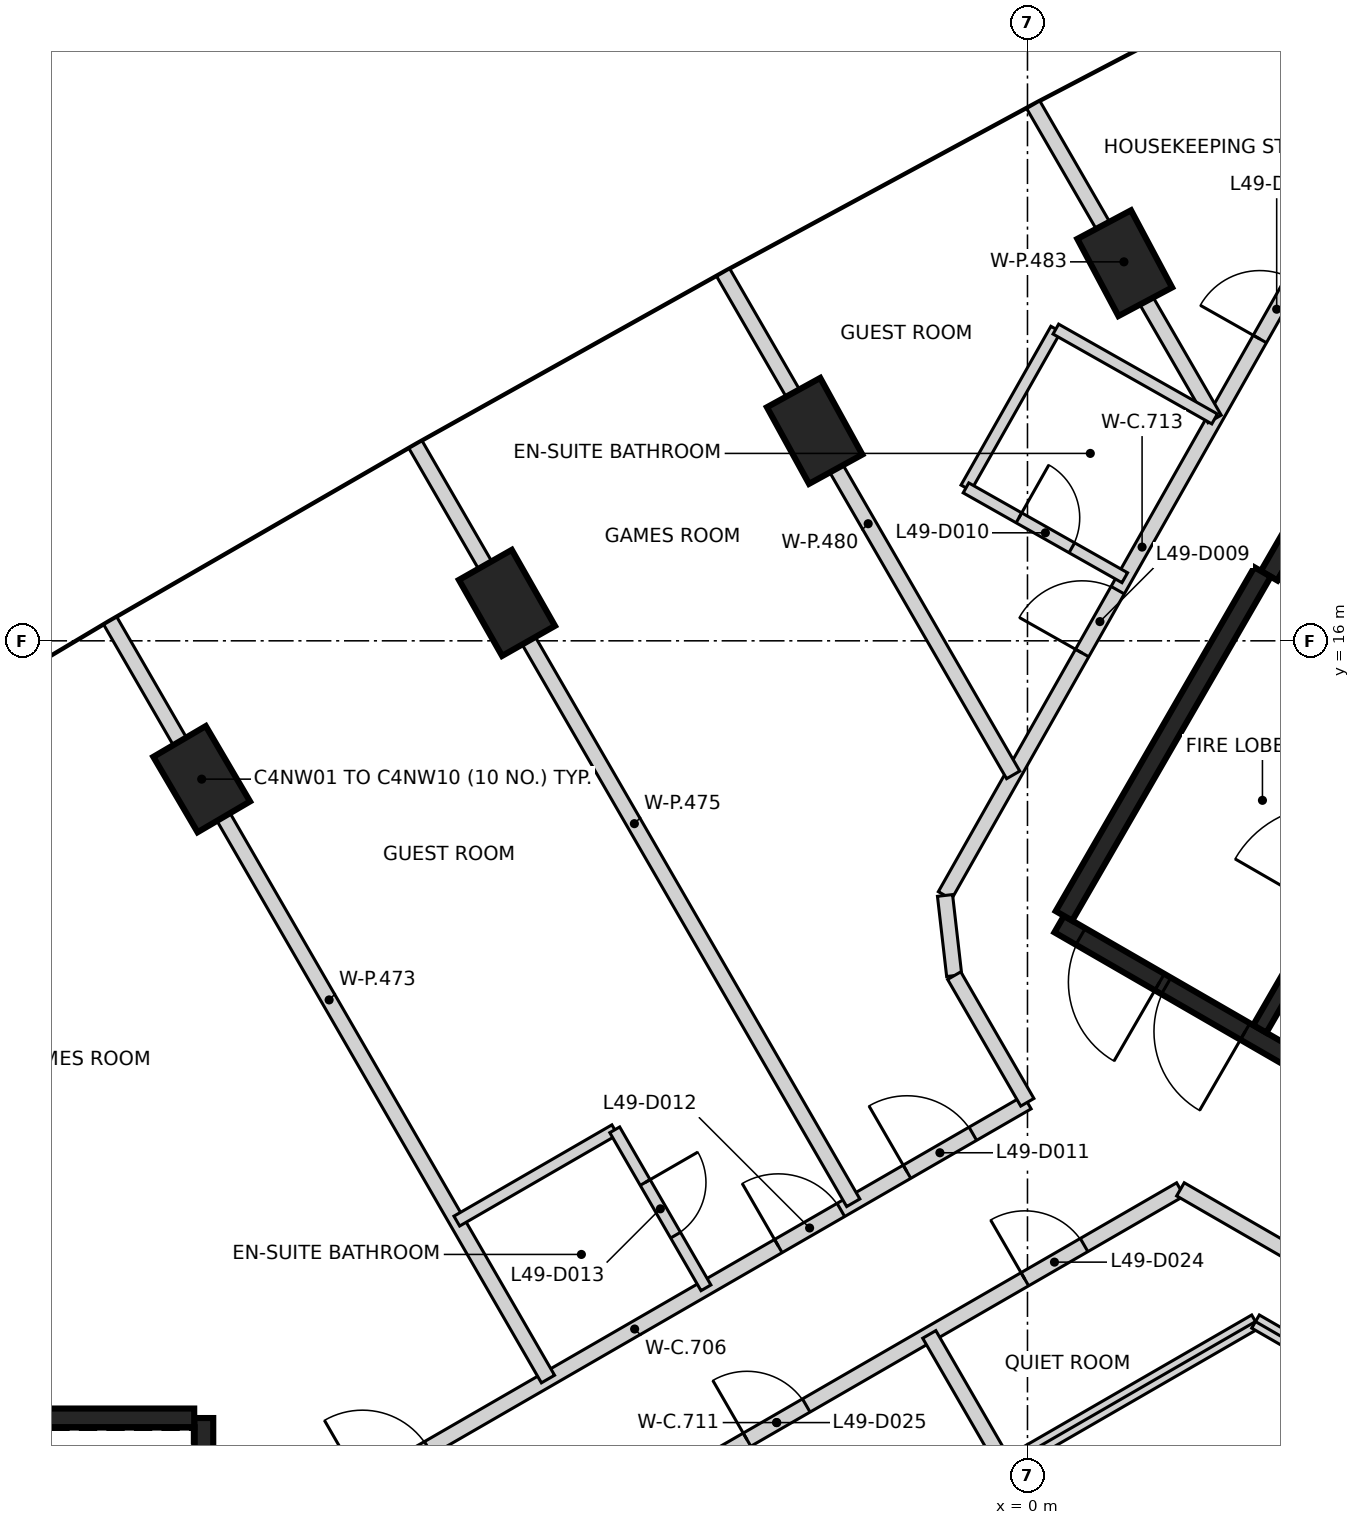
"""IFC4 building model, lengths in metres.
Left out: names, types, materials, properties, quantities, classifications, styles, units other than length and angle.
Written with IfcOpenShell. Run it as: python <this file> out.ifc"""

import sys

from ifc_helpers import new_model, si_unit, direction, frame, frame_2d, origin, origin_2d, place, context, subcontext, project, spatial, rectangle, extrude, element, fill, save


model = new_model("IFC4")
c1 = context("Model", 3, precision=1e-05, world=origin(), true_north=direction((0.0, 1.0)))
c2 = subcontext(c1, "Body", "Model", "MODEL_VIEW")
j1 = project(units=[si_unit("LENGTHUNIT", "METRE"), si_unit("PLANEANGLEUNIT", "RADIAN")], contexts=[c1])
p1 = place(None, origin())
s1 = spatial("IfcSite", under=j1, at=p1, CompositionType="ELEMENT")
p2 = place(p1, origin())
s2 = spatial("IfcBuilding", under=s1, at=p2, CompositionType="ELEMENT")
p3 = place(p2, frame((0.0, 0.0, 197.2)))
s3 = spatial("IfcBuildingStorey", under=s2, at=p3, CompositionType="ELEMENT", Elevation=197.2)
for number, where, z_axis, x_axis in (
    (1, (1.279, 20.968, -0.35), (0.0, 0.0, 1.0), (-0.47, 0.883, 0.0)),
    (2, (-2.8, 18.762, -0.35), (0.0, 0.0, 1.0), (-0.482, 0.876, 0.0)),
    (3, (-6.848, 16.499, -0.35), (0.0, 0.0, 1.0), (-0.494, 0.87, 0.0)),
    (4, (-10.864, 14.18, -0.35), (0.0, 0.0, 1.0), (-0.506, 0.862, 0.0)),
):
    element("IfcColumn", number, at=place(p3, frame(where, z_axis=z_axis, x_axis=x_axis)), inside=s3, PredefinedType="COLUMN", context=c2, shape_type="SweptSolid", body=[
        extrude(rectangle(XDim=1.15, YDim=0.8, at=origin_2d()), origin(), (0.0, 0.0, 1.0), 3.6),
    ])
p4 = place(p3, frame((-10.837, 5.775, 0.0), z_axis=(0.0, 0.0, 1.0), x_axis=(0.0, -1.0, 0.0)))
e5 = element("IfcWall", 5, at=p4, inside=s3, PredefinedType="SHEAR", context=c2, shape_type="SweptSolid", body=[
    extrude(rectangle(XDim=11.55, YDim=0.25, at=frame_2d((5.775, 0.0))), origin(), (0.0, 0.0, 1.0), 3.25),
])
p5 = place(p4, frame((10.025, 0.0, 0.0)))
e6 = element("IfcOpeningElement", 6, at=p5, cuts=e5, PredefinedType="OPENING", context=c2, shape_type="SweptSolid", body=[
    extrude(rectangle(XDim=1.2, YDim=2.1, at=frame_2d((0.6, 1.05))), frame((0.0, 0.135, 0.0), z_axis=(0.0, -1.0, 0.0), x_axis=(1.0, 0.0, 0.0)), (0.0, 0.0, 1.0), 0.27),
])
p6 = place(p4, frame((8.725, 0.0, 0.0)))
e7 = element("IfcOpeningElement", 7, at=p6, cuts=e5, PredefinedType="OPENING", context=c2, shape_type="SweptSolid", body=[
    extrude(rectangle(XDim=1.2, YDim=2.1, at=frame_2d((0.6, 1.05))), frame((0.0, 0.135, 0.0), z_axis=(0.0, -1.0, 0.0), x_axis=(1.0, 0.0, 0.0)), (0.0, 0.0, 1.0), 0.27),
])
p7 = place(p3, frame((-16.472, 5.775, 0.0), z_axis=(0.0, 0.0, 1.0), x_axis=(1.0, 0.0, 0.0)))
e8 = element("IfcWall", 8, at=p7, inside=s3, PredefinedType="SHEAR", context=c2, shape_type="SweptSolid", body=[
    extrude(rectangle(XDim=5.51, YDim=0.25, at=frame_2d((2.755, 0.0))), origin(), (0.0, 0.0, 1.0), 3.25),
])
p8 = place(p3, frame((10.42, 6.498, 0.0), z_axis=(0.0, 0.0, 1.0), x_axis=(-0.866021906294, 0.500006057782, 0.0)))
e9 = element("IfcWall", 9, at=p8, inside=s3, PredefinedType="SHEAR", context=c2, shape_type="SweptSolid", body=[
    extrude(rectangle(XDim=11.55, YDim=0.25, at=frame_2d((5.775, 0.0))), origin(), (0.0, 0.0, 1.0), 3.25),
])
p9 = place(p8, frame((10.025, 0.0, 0.0)))
e10 = element("IfcOpeningElement", 10, at=p9, cuts=e9, PredefinedType="OPENING", context=c2, shape_type="SweptSolid", body=[
    extrude(rectangle(XDim=1.2, YDim=2.1, at=frame_2d((0.6, 1.05))), frame((0.0, 0.135, 0.0), z_axis=(0.0, -1.0, 0.0), x_axis=(1.0, 0.0, 0.0)), (0.0, 0.0, 1.0), 0.27),
])
p10 = place(p8, frame((8.725, 0.0, 0.0)))
e11 = element("IfcOpeningElement", 11, at=p10, cuts=e9, PredefinedType="OPENING", context=c2, shape_type="SweptSolid", body=[
    extrude(rectangle(XDim=1.2, YDim=2.1, at=frame_2d((0.6, 1.05))), frame((0.0, 0.135, 0.0), z_axis=(0.0, -1.0, 0.0), x_axis=(1.0, 0.0, 0.0)), (0.0, 0.0, 1.0), 0.27),
])
p11 = place(p3, frame((3.179, 16.856, 0.0), z_axis=(0.0, 0.0, 1.0), x_axis=(0.500001955336, 0.866024274868, 0.0)))
e12 = element("IfcWall", 12, at=p11, inside=s3, PredefinedType="SHEAR", context=c2, shape_type="SweptSolid", body=[
    extrude(rectangle(XDim=6.125, YDim=0.25, at=frame_2d((3.062, 0.0))), origin(), (0.0, 0.0, 1.0), 3.25),
])
p12 = place(p11, frame((3.563, 0.0, 0.0)))
e13 = element("IfcOpeningElement", 13, at=p12, cuts=e12, PredefinedType="OPENING", context=c2, shape_type="SweptSolid", body=[
    extrude(rectangle(XDim=1.0, YDim=2.1, at=frame_2d((0.5, 1.05))), frame((0.0, 0.135, 0.0), z_axis=(0.0, -1.0, 0.0), x_axis=(1.0, 0.0, 0.0)), (0.0, 0.0, 1.0), 0.27),
])
p13 = place(p3, frame((0.48, 12.381, 0.0), z_axis=(0.0, 0.0, 1.0), x_axis=(0.49999885962, 0.866026062182, 0.0)))
e14 = element("IfcWall", 14, at=p13, inside=s3, PredefinedType="SHEAR", context=c2, shape_type="SweptSolid", body=[
    extrude(rectangle(XDim=5.225, YDim=0.25, at=frame_2d((2.612, 0.0))), origin(), (0.0, 0.0, 1.0), 3.25),
])
p14 = place(p3, frame((3.057, 10.895, 0.0), z_axis=(0.0, 0.0, 1.0), x_axis=(0.500027839223, 0.866009330205, 0.0)))
e15 = element("IfcWall", 15, at=p14, inside=s3, PredefinedType="SHEAR", context=c2, shape_type="SweptSolid", body=[
    extrude(rectangle(XDim=5.098, YDim=0.2, at=frame_2d((2.549, 0.0))), origin(), (0.0, 0.0, 1.0), 3.25),
])
p15 = place(p14, frame((1.774, 0.0, 0.0)))
e16 = element("IfcOpeningElement", 16, at=p15, cuts=e15, PredefinedType="OPENING", context=c2, shape_type="SweptSolid", body=[
    extrude(rectangle(XDim=1.4, YDim=2.1, at=frame_2d((0.7, 1.05))), frame((0.0, 0.11, 0.0), z_axis=(0.0, -1.0, 0.0), x_axis=(1.0, 0.0, 0.0)), (0.0, 0.0, 1.0), 0.22),
])
p16 = place(p3, frame((5.646, 15.576, 0.0), z_axis=(0.0, 0.0, 1.0), x_axis=(-0.866018407898, 0.500012117035, 0.0)))
e17 = element("IfcWall", 17, at=p16, inside=s3, PredefinedType="SHEAR", context=c2, shape_type="SweptSolid", body=[
    extrude(rectangle(XDim=2.651, YDim=0.2, at=frame_2d((1.325, 0.0))), origin(), (0.0, 0.0, 1.0), 3.25),
])
p17 = place(p16, frame((0.652, 0.0, 0.0)))
e18 = element("IfcOpeningElement", 18, at=p17, cuts=e17, PredefinedType="OPENING", context=c2, shape_type="SweptSolid", body=[
    extrude(rectangle(XDim=1.3, YDim=2.1, at=frame_2d((0.65, 1.05))), frame((0.0, 0.11, 0.0), z_axis=(0.0, -1.0, 0.0), x_axis=(1.0, 0.0, 0.0)), (0.0, 0.0, 1.0), 0.22),
])
p18 = place(p3, frame((-10.334, 3.963, 0.0), z_axis=(0.0, 0.0, 1.0), x_axis=(0.866013159114, 0.500021207791, 0.0)))
e19 = element("IfcWall", 19, at=p18, inside=s3, PredefinedType="PARTITIONING", context=c2, shape_type="SweptSolid", body=[
    extrude(rectangle(XDim=11.931, YDim=0.2, at=frame_2d((5.966, 0.0))), origin(), (0.0, 0.0, 1.0), 3.25),
])
p19 = place(p18, frame((10.103, 0.0, 0.0)))
e20 = element("IfcOpeningElement", 20, at=p19, cuts=e19, PredefinedType="OPENING", context=c2, shape_type="SweptSolid", body=[
    extrude(rectangle(XDim=1.0, YDim=2.1, at=frame_2d((0.5, 1.05))), frame((0.0, 0.11, 0.0), z_axis=(0.0, -1.0, 0.0), x_axis=(1.0, 0.0, 0.0)), (0.0, 0.0, 1.0), 0.22),
])
p20 = place(p18, frame((8.149, 0.0, 0.0)))
e21 = element("IfcOpeningElement", 21, at=p20, cuts=e19, PredefinedType="OPENING", context=c2, shape_type="SweptSolid", body=[
    extrude(rectangle(XDim=0.95, YDim=2.1, at=frame_2d((0.475, 1.05))), frame((0.0, 0.11, 0.0), z_axis=(0.0, -1.0, 0.0), x_axis=(1.0, 0.0, 0.0)), (0.0, 0.0, 1.0), 0.22),
])
p21 = place(p18, frame((1.831, 0.0, 0.0)))
e22 = element("IfcOpeningElement", 22, at=p21, cuts=e19, PredefinedType="OPENING", context=c2, shape_type="SweptSolid", body=[
    extrude(rectangle(XDim=1.0, YDim=2.1, at=frame_2d((0.5, 1.05))), frame((0.0, 0.11, 0.0), z_axis=(0.0, -1.0, 0.0), x_axis=(1.0, 0.0, 0.0)), (0.0, 0.0, 1.0), 0.22),
])
p22 = place(p3, frame((-8.611, 2.648, 0.0), z_axis=(0.0, 0.0, 1.0), x_axis=(0.865953566425, 0.500124405319, 0.0)))
e23 = element("IfcWall", 23, at=p22, inside=s3, PredefinedType="PARTITIONING", context=c2, shape_type="SweptSolid", body=[
    extrude(rectangle(XDim=12.267, YDim=0.2, at=frame_2d((6.134, 0.0))), origin(), (0.0, 0.0, 1.0), 3.25),
])
p23 = place(p22, frame((9.904, 0.0, 0.0)))
e24 = element("IfcOpeningElement", 24, at=p23, cuts=e23, PredefinedType="OPENING", context=c2, shape_type="SweptSolid", body=[
    extrude(rectangle(XDim=0.9, YDim=2.1, at=frame_2d((0.45, 1.05))), frame((0.0, 0.11, 0.0), z_axis=(0.0, -1.0, 0.0), x_axis=(1.0, 0.0, 0.0)), (0.0, 0.0, 1.0), 0.22),
])
p24 = place(p22, frame((5.683, 0.0, 0.0)))
e25 = element("IfcOpeningElement", 25, at=p24, cuts=e23, PredefinedType="OPENING", context=c2, shape_type="SweptSolid", body=[
    extrude(rectangle(XDim=0.9, YDim=2.1, at=frame_2d((0.45, 1.05))), frame((0.0, 0.11, 0.0), z_axis=(0.0, -1.0, 0.0), x_axis=(1.0, 0.0, 0.0)), (0.0, 0.0, 1.0), 0.22),
])
p25 = place(p22, frame((1.463, 0.0, 0.0)))
e26 = element("IfcOpeningElement", 26, at=p25, cuts=e23, PredefinedType="OPENING", context=c2, shape_type="SweptSolid", body=[
    extrude(rectangle(XDim=0.9, YDim=2.1, at=frame_2d((0.45, 1.05))), frame((0.0, 0.11, 0.0), z_axis=(0.0, -1.0, 0.0), x_axis=(1.0, 0.0, 0.0)), (0.0, 0.0, 1.0), 0.22),
])
p26 = place(p3, frame((-1.086, 12.65, 0.0), z_axis=(0.0, 0.0, 1.0), x_axis=(0.492507119433, 0.870308415051, 0.0)))
e27 = element("IfcWall", 27, at=p26, inside=s3, PredefinedType="PARTITIONING", context=c2, shape_type="SweptSolid", body=[
    extrude(rectangle(XDim=10.531, YDim=0.2, at=frame_2d((5.266, 0.0))), origin(), (0.0, 0.0, 1.0), 3.25),
])
p27 = place(p26, frame((8.411, 0.0, 0.0)))
e28 = element("IfcOpeningElement", 28, at=p27, cuts=e27, PredefinedType="OPENING", context=c2, shape_type="SweptSolid", body=[
    extrude(rectangle(XDim=0.9, YDim=2.1, at=frame_2d((0.45, 1.05))), frame((0.0, 0.11, 0.0), z_axis=(0.0, -1.0, 0.0), x_axis=(1.0, 0.0, 0.0)), (0.0, 0.0, 1.0), 0.22),
])
p28 = place(p26, frame((3.664, 0.0, 0.0)))
e29 = element("IfcOpeningElement", 29, at=p28, cuts=e27, PredefinedType="OPENING", context=c2, shape_type="SweptSolid", body=[
    extrude(rectangle(XDim=0.95, YDim=2.1, at=frame_2d((0.475, 1.05))), frame((0.0, 0.11, 0.0), z_axis=(0.0, -1.0, 0.0), x_axis=(1.0, 0.0, 0.0)), (0.0, 0.0, 1.0), 0.22),
])
p29 = place(p3, frame((-1.085, 12.65, 0.0), z_axis=(0.0, 0.0, 1.0), x_axis=(0.113812454263, -0.993502252264, 0.0)))
e30 = element("IfcWall", 30, at=p29, inside=s3, PredefinedType="PARTITIONING", context=c2, shape_type="SweptSolid", body=[
    extrude(rectangle(XDim=1.062, YDim=0.2, at=frame_2d((0.531, 0.0))), origin(), (0.0, 0.0, 1.0), 3.25),
])
p30 = place(p3, frame((-0.964, 11.595, 0.0), z_axis=(0.0, 0.0, 1.0), x_axis=(0.500110566207, -0.865961558944, 0.0)))
e31 = element("IfcWall", 31, at=p30, inside=s3, PredefinedType="PARTITIONING", context=c2, shape_type="SweptSolid", body=[
    extrude(rectangle(XDim=1.924, YDim=0.2, at=frame_2d((0.962, 0.0))), origin(), (0.0, 0.0, 1.0), 3.25),
])
p31 = place(p3, frame((2.012, 8.784, 0.0), z_axis=(0.0, 0.0, 1.0), x_axis=(0.865934186891, -0.500157959022, 0.0)))
e32 = element("IfcWall", 32, at=p31, inside=s3, PredefinedType="PARTITIONING", context=c2, shape_type="SweptSolid", body=[
    extrude(rectangle(XDim=1.666, YDim=0.2, at=frame_2d((0.833, 0.0))), origin(), (0.0, 0.0, 1.0), 3.25),
])
for number, where, z_axis, x_axis in (
    (33, (-12.067, 16.263, 0.0), (0.0, 0.0, 1.0), (0.5, -0.866, 0.0)),
    (34, (-8.052, 18.582, 0.0), (0.0, 0.0, 1.0), (0.5, -0.866, 0.0)),
):
    element("IfcWall", number, at=place(p3, frame(where, z_axis=z_axis, x_axis=x_axis)), inside=s3, PredefinedType="PARTITIONING", context=c2, shape_type="SweptSolid", body=[
        extrude(rectangle(XDim=11.519, YDim=0.2, at=frame_2d((5.759, 0.0))), origin(), (0.0, 0.0, 1.0), 3.25),
    ])
p32 = place(p3, frame((-7.599, 0.923, 0.0), z_axis=(0.0, 0.0, 1.0), x_axis=(0.865957029593, 0.500118408877, 0.0)))
e35 = element("IfcWall", 35, at=p32, inside=s3, PredefinedType="PARTITIONING", context=c2, shape_type="SweptSolid", body=[
    extrude(rectangle(XDim=12.24, YDim=0.2, at=frame_2d((6.12, 0.0))), origin(), (0.0, 0.0, 1.0), 3.25),
])
p33 = place(p3, frame((-4.004, 20.845, 0.0), z_axis=(0.0, 0.0, 1.0), x_axis=(0.500003076341, -0.866023627651, 0.0)))
e36 = element("IfcWall", 36, at=p33, inside=s3, PredefinedType="PARTITIONING", context=c2, shape_type="SweptSolid", body=[
    extrude(rectangle(XDim=7.631, YDim=0.2, at=frame_2d((3.816, 0.0))), origin(), (0.0, 0.0, 1.0), 3.25),
])
p34 = place(p3, frame((-1.292, 6.875, 0.0), z_axis=(0.0, 0.0, 1.0), x_axis=(0.50002537861, -0.866010750942, 0.0)))
e37 = element("IfcWall", 37, at=p34, inside=s3, PredefinedType="PARTITIONING", context=c2, shape_type="SweptSolid", body=[
    extrude(rectangle(XDim=2.0, YDim=0.2, at=frame_2d((1.0, 0.0))), origin(), (0.0, 0.0, 1.0), 3.25),
])
p35 = place(p3, frame((0.076, 23.052, 0.0), z_axis=(0.0, 0.0, 1.0), x_axis=(0.499957131376, -0.866050152581, 0.0)))
e38 = element("IfcWall", 38, at=p35, inside=s3, PredefinedType="PARTITIONING", context=c2, shape_type="SweptSolid", body=[
    extrude(rectangle(XDim=4.773, YDim=0.2, at=frame_2d((2.386, 0.0))), origin(), (0.0, 0.0, 1.0), 3.25),
])
p36 = place(p3, frame((3.0, 7.044, 0.0), z_axis=(0.0, 0.0, 1.0), x_axis=(0.865875248522, -0.500259986404, 0.0)))
e39 = element("IfcWall", 39, at=p36, inside=s3, PredefinedType="PARTITIONING", context=c2, shape_type="SweptSolid", body=[
    extrude(rectangle(XDim=1.848, YDim=0.2, at=frame_2d((0.924, 0.0))), origin(), (0.0, 0.0, 1.0), 3.25),
])
p37 = place(p3, frame((-7.508, 8.366, 0.0), z_axis=(0.0, 0.0, 1.0), x_axis=(0.865822967017, 0.500350466959, 0.0)))
e40 = element("IfcWall", 40, at=p37, inside=s3, PredefinedType="PARTITIONING", context=c2, shape_type="SweptSolid", body=[
    extrude(rectangle(XDim=2.4, YDim=0.15, at=frame_2d((1.2, 0.0))), origin(), (0.0, 0.0, 1.0), 3.25),
])
p38 = place(p3, frame((-5.43, 9.567, 0.0), z_axis=(0.0, 0.0, 1.0), x_axis=(0.499913221443, -0.866075499611, 0.0)))
e41 = element("IfcWall", 41, at=p38, inside=s3, PredefinedType="PARTITIONING", context=c2, shape_type="SweptSolid", body=[
    extrude(rectangle(XDim=2.4, YDim=0.15, at=frame_2d((1.2, 0.0))), origin(), (0.0, 0.0, 1.0), 3.25),
])
p39 = place(p38, frame((0.801, 0.0, 0.0)))
e42 = element("IfcOpeningElement", 42, at=p39, cuts=e41, PredefinedType="OPENING", context=c2, shape_type="SweptSolid", body=[
    extrude(rectangle(XDim=0.8, YDim=2.1, at=frame_2d((0.4, 1.05))), frame((0.0, 0.085, 0.0), z_axis=(0.0, -1.0, 0.0), x_axis=(1.0, 0.0, 0.0)), (0.0, 0.0, 1.0), 0.17),
])
p40 = place(p3, frame((-0.809, 18.012, 0.0), z_axis=(0.0, 0.0, 1.0), x_axis=(0.492476131012, 0.870325950655, 0.0)))
e43 = element("IfcWall", 43, at=p40, inside=s3, PredefinedType="PARTITIONING", context=c2, shape_type="SweptSolid", body=[
    extrude(rectangle(XDim=2.4, YDim=0.15, at=frame_2d((1.2, 0.0))), origin(), (0.0, 0.0, 1.0), 3.25),
])
p41 = place(p3, frame((-0.809, 18.012, 0.0), z_axis=(0.0, 0.0, 1.0), x_axis=(0.870369543509, -0.492399083806, 0.0)))
e44 = element("IfcWall", 44, at=p41, inside=s3, PredefinedType="PARTITIONING", context=c2, shape_type="SweptSolid", body=[
    extrude(rectangle(XDim=2.4, YDim=0.15, at=frame_2d((1.2, 0.0))), origin(), (0.0, 0.0, 1.0), 3.25),
])
p42 = place(p41, frame((0.8, 0.0, 0.0)))
e45 = element("IfcOpeningElement", 45, at=p42, cuts=e44, PredefinedType="OPENING", context=c2, shape_type="SweptSolid", body=[
    extrude(rectangle(XDim=0.8, YDim=2.1, at=frame_2d((0.4, 1.05))), frame((0.0, 0.085, 0.0), z_axis=(0.0, -1.0, 0.0), x_axis=(1.0, 0.0, 0.0)), (0.0, 0.0, 1.0), 0.17),
])
p43 = place(p3, frame((0.373, 20.101, 0.0), z_axis=(0.0, 0.0, 1.0), x_axis=(0.870301279559, -0.492519728334, 0.0)))
e46 = element("IfcWall", 46, at=p43, inside=s3, PredefinedType="PARTITIONING", context=c2, shape_type="SweptSolid", body=[
    extrude(rectangle(XDim=2.4, YDim=0.15, at=frame_2d((1.2, 0.0))), origin(), (0.0, 0.0, 1.0), 3.25),
])
p44 = place(p9, origin())
e47 = element("IfcDoor", 47, at=p44, inside=s3, OperationType="SINGLE_SWING_LEFT", PredefinedType="DOOR", context=c2, shape_type="SweptSolid", body=[
    extrude(rectangle(XDim=1.2, YDim=2.1, at=frame_2d((0.6, 1.05))), frame((0.0, 0.025, 0.0), z_axis=(0.0, -1.0, 0.0), x_axis=(1.0, 0.0, 0.0)), (0.0, 0.0, 1.0), 0.05),
])
fill(e10, e47)
p45 = place(p10, origin())
e48 = element("IfcDoor", 48, at=p45, inside=s3, OperationType="SINGLE_SWING_RIGHT", PredefinedType="DOOR", context=c2, shape_type="SweptSolid", body=[
    extrude(rectangle(XDim=1.2, YDim=2.1, at=frame_2d((0.6, 1.05))), frame((0.0, 0.025, 0.0), z_axis=(0.0, -1.0, 0.0), x_axis=(1.0, 0.0, 0.0)), (0.0, 0.0, 1.0), 0.05),
])
fill(e11, e48)
p46 = place(p27, origin())
e49 = element("IfcDoor", 49, at=p46, inside=s3, OperationType="SINGLE_SWING_LEFT", PredefinedType="DOOR", context=c2, shape_type="SweptSolid", body=[
    extrude(rectangle(XDim=0.9, YDim=2.1, at=frame_2d((0.45, 1.05))), frame((0.0, 0.025, 0.0), z_axis=(0.0, -1.0, 0.0), x_axis=(1.0, 0.0, 0.0)), (0.0, 0.0, 1.0), 0.05),
])
fill(e28, e49)
p47 = place(p28, origin())
e50 = element("IfcDoor", 50, at=p47, inside=s3, OperationType="SINGLE_SWING_LEFT", PredefinedType="DOOR", context=c2, shape_type="SweptSolid", body=[
    extrude(rectangle(XDim=0.95, YDim=2.1, at=frame_2d((0.475, 1.05))), frame((0.0, 0.025, 0.0), z_axis=(0.0, -1.0, 0.0), x_axis=(1.0, 0.0, 0.0)), (0.0, 0.0, 1.0), 0.05),
])
fill(e29, e50)
p48 = place(p42, origin())
e51 = element("IfcDoor", 51, at=p48, inside=s3, OperationType="SINGLE_SWING_LEFT", PredefinedType="DOOR", context=c2, shape_type="SweptSolid", body=[
    extrude(rectangle(XDim=0.8, YDim=2.1, at=frame_2d((0.4, 1.05))), frame((0.0, 0.025, 0.0), z_axis=(0.0, -1.0, 0.0), x_axis=(1.0, 0.0, 0.0)), (0.0, 0.0, 1.0), 0.05),
])
fill(e45, e51)
p49 = place(p19, origin())
e52 = element("IfcDoor", 52, at=p49, inside=s3, OperationType="SINGLE_SWING_LEFT", PredefinedType="DOOR", context=c2, shape_type="SweptSolid", body=[
    extrude(rectangle(XDim=1.0, YDim=2.1, at=frame_2d((0.5, 1.05))), frame((0.0, 0.025, 0.0), z_axis=(0.0, -1.0, 0.0), x_axis=(1.0, 0.0, 0.0)), (0.0, 0.0, 1.0), 0.05),
])
fill(e20, e52)
p50 = place(p20, origin())
e53 = element("IfcDoor", 53, at=p50, inside=s3, OperationType="SINGLE_SWING_LEFT", PredefinedType="DOOR", context=c2, shape_type="SweptSolid", body=[
    extrude(rectangle(XDim=0.95, YDim=2.1, at=frame_2d((0.475, 1.05))), frame((0.0, 0.025, 0.0), z_axis=(0.0, -1.0, 0.0), x_axis=(1.0, 0.0, 0.0)), (0.0, 0.0, 1.0), 0.05),
])
fill(e21, e53)
p51 = place(p39, frame((0.8, 0.0, 0.0), z_axis=(0.0, 0.0, 1.0), x_axis=(-1.0, 0.0, 0.0)))
e54 = element("IfcDoor", 54, at=p51, inside=s3, OperationType="SINGLE_SWING_LEFT", PredefinedType="DOOR", context=c2, shape_type="SweptSolid", body=[
    extrude(rectangle(XDim=0.8, YDim=2.1, at=frame_2d((0.4, 1.05))), frame((0.0, 0.025, 0.0), z_axis=(0.0, -1.0, 0.0), x_axis=(1.0, 0.0, 0.0)), (0.0, 0.0, 1.0), 0.05),
])
fill(e42, e54)
p52 = place(p23, frame((0.9, 0.0, 0.0), z_axis=(0.0, 0.0, 1.0), x_axis=(-1.0, 0.0, 0.0)))
e55 = element("IfcDoor", 55, at=p52, inside=s3, OperationType="SINGLE_SWING_LEFT", PredefinedType="DOOR", context=c2, shape_type="SweptSolid", body=[
    extrude(rectangle(XDim=0.9, YDim=2.1, at=frame_2d((0.45, 1.05))), frame((0.0, 0.025, 0.0), z_axis=(0.0, -1.0, 0.0), x_axis=(1.0, 0.0, 0.0)), (0.0, 0.0, 1.0), 0.05),
])
fill(e24, e55)
p53 = place(p24, frame((0.9, 0.0, 0.0), z_axis=(0.0, 0.0, 1.0), x_axis=(-1.0, 0.0, 0.0)))
e56 = element("IfcDoor", 56, at=p53, inside=s3, OperationType="SINGLE_SWING_LEFT", PredefinedType="DOOR", context=c2, shape_type="SweptSolid", body=[
    extrude(rectangle(XDim=0.9, YDim=2.1, at=frame_2d((0.45, 1.05))), frame((0.0, 0.025, 0.0), z_axis=(0.0, -1.0, 0.0), x_axis=(1.0, 0.0, 0.0)), (0.0, 0.0, 1.0), 0.05),
])
fill(e25, e56)
save(model, sys.argv[1])
